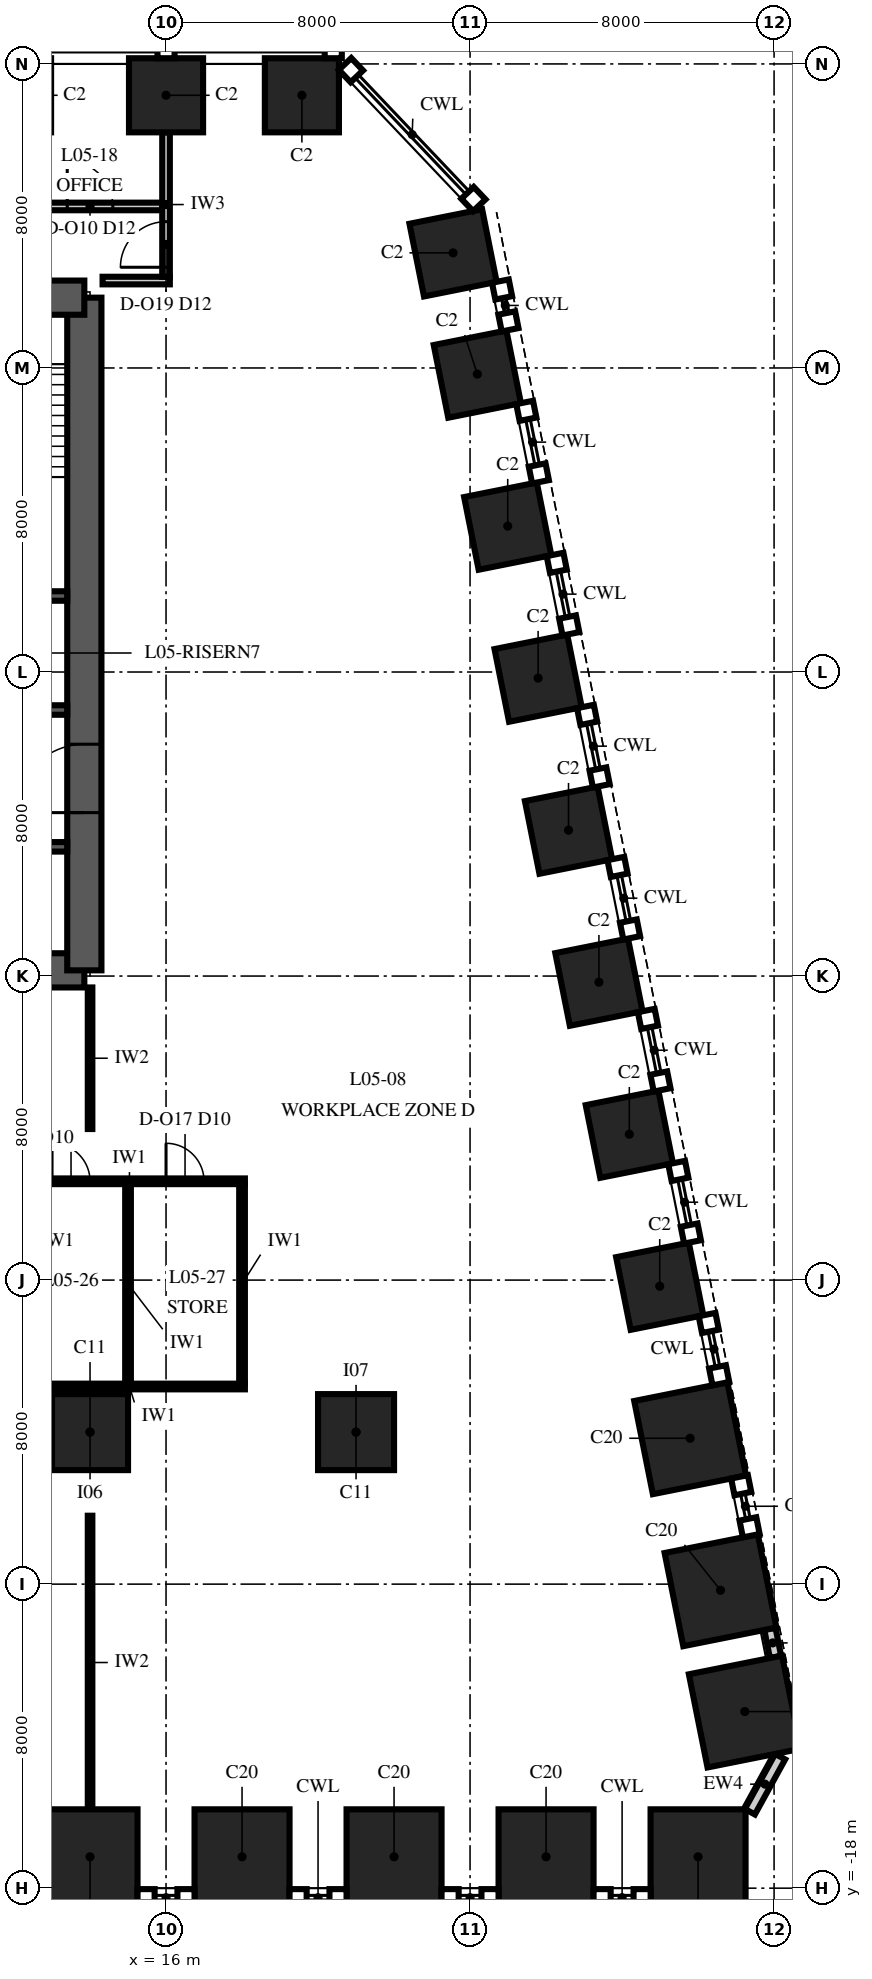
"""IFC4 building model, lengths in metres.
Left out: names, types, materials, properties, quantities, classifications, styles, units other than length and angle.
Written with IfcOpenShell. Run it as: python <this file> out.ifc"""

import sys

from ifc_helpers import new_model, si_unit, direction, frame, frame_2d, origin, origin_2d, place, context, subcontext, project, spatial, polyline, rectangle, outline, extrude, element, fill, save


model = new_model("IFC4")
c1 = context("Model", 3, precision=1e-05, world=origin(), true_north=direction((0.0, 1.0)))
c2 = subcontext(c1, "Body", "Model", "MODEL_VIEW")
j1 = project(units=[si_unit("LENGTHUNIT", "METRE"), si_unit("PLANEANGLEUNIT", "RADIAN")], contexts=[c1])
p1 = place(None, origin())
s1 = spatial("IfcSite", under=j1, at=p1, CompositionType="ELEMENT")
p2 = place(p1, origin())
s2 = spatial("IfcBuilding", under=s1, at=p2, CompositionType="ELEMENT")
p3 = place(p2, frame((0.0, 0.0, 32.0)))
s3 = spatial("IfcBuildingStorey", under=s2, at=p3, CompositionType="ELEMENT", Elevation=32.0)
for number, where, z_axis, x_axis in (
    (1, (14.0, -17.175, 0.0), (0.0, 0.0, 1.0), (1.0, 0.0, 0.0)),
    (2, (18.0, -17.175, 0.0), (0.0, 0.0, 1.0), (1.0, 0.0, 0.0)),
    (3, (22.0, -17.175, 0.0), (0.0, 0.0, 1.0), (1.0, 0.0, 0.0)),
    (4, (26.0, -17.175, 0.0), (0.0, 0.0, 1.0), (1.0, 0.0, 0.0)),
    (5, (30.0, -17.175, 0.0), (0.0, 0.0, 1.0), (1.0, 0.0, 0.0)),
    (6, (31.229, -13.353, 0.0), (0.0, 0.0, 1.0), (-0.196, 0.981, 0.0)),
    (7, (30.591, -10.162, 0.0), (0.0, 0.0, 1.0), (-0.196, 0.981, 0.0)),
    (8, (29.791, -6.162, 0.0), (0.0, 0.0, 1.0), (-0.196, 0.981, 0.0)),
):
    element("IfcColumn", number, at=place(p3, frame(where, z_axis=z_axis, x_axis=x_axis)), inside=s3, PredefinedType="COLUMN", context=c2, shape_type="SweptSolid", body=[
        extrude(rectangle(XDim=2.5, YDim=2.5, at=origin_2d()), origin(), (0.0, 0.0, 1.0), 4.0),
    ])
for number, where, z_axis, x_axis in (
    (9, (28.991, -2.162, 0.0), (0.0, 0.0, 1.0), (-0.196, 0.981, 0.0)),
    (10, (28.191, 1.838, 0.0), (0.0, 0.0, 1.0), (-0.196, 0.981, 0.0)),
    (11, (27.391, 5.838, 0.0), (0.0, 0.0, 1.0), (-0.196, 0.981, 0.0)),
    (12, (26.591, 9.838, 0.0), (0.0, 0.0, 1.0), (-0.196, 0.981, 0.0)),
    (13, (25.791, 13.838, 0.0), (0.0, 0.0, 1.0), (-0.196, 0.981, 0.0)),
    (14, (24.991, 17.838, 0.0), (0.0, 0.0, 1.0), (-0.196, 0.981, 0.0)),
    (15, (24.191, 21.838, 0.0), (0.0, 0.0, 1.0), (-0.196, 0.981, 0.0)),
    (16, (23.553, 25.029, 0.0), (0.0, 0.0, 1.0), (-0.196, 0.981, 0.0)),
    (17, (19.575, 29.175, 0.0), (0.0, 0.0, 1.0), (-1.0, 0.0, 0.0)),
    (18, (16.0, 29.175, 0.0), (0.0, 0.0, 1.0), (-1.0, 0.0, 0.0)),
):
    element("IfcColumn", number, at=place(p3, frame(where, z_axis=z_axis, x_axis=x_axis)), inside=s3, PredefinedType="COLUMN", context=c2, shape_type="SweptSolid", body=[
        extrude(rectangle(XDim=1.95, YDim=1.95, at=origin_2d()), origin(), (0.0, 0.0, 1.0), 4.0),
    ])
for number, where, z_axis, x_axis in (
    (19, (14.0, -6.0, 0.0), (0.0, 0.0, 1.0), (1.0, 0.0, 0.0)),
    (20, (21.0, -6.0, 0.0), (0.0, 0.0, 1.0), (1.0, 0.0, 0.0)),
):
    element("IfcColumn", number, at=place(p3, frame(where, z_axis=z_axis, x_axis=x_axis)), inside=s3, PredefinedType="COLUMN", context=c2, shape_type="SweptSolid", body=[
        extrude(rectangle(XDim=2.0, YDim=2.0, at=origin_2d()), origin(), (0.0, 0.0, 1.0), 4.0),
    ])
p4 = place(p3, frame((-13.85, 6.15, 0.0), z_axis=(0.0, 0.0, 1.0), x_axis=(1.0, 0.0, 0.0)))
e21 = element("IfcWall", 21, at=p4, inside=s3, PredefinedType="SHEAR", context=c2, shape_type="SweptSolid", body=[
    extrude(rectangle(XDim=27.7, YDim=0.9, at=frame_2d((13.85, 0.0))), origin(), (0.0, 0.0, 1.0), 4.0),
])
p5 = place(p3, frame((13.85, 6.15, 0.0), z_axis=(0.0, 0.0, 1.0), x_axis=(0.0, 1.0, 0.0)))
e22 = element("IfcWall", 22, at=p5, inside=s3, PredefinedType="SHEAR", context=c2, shape_type="SweptSolid", body=[
    extrude(outline(polyline([(0.0, -0.45), (17.7, -0.45), (17.7, 0.0), (17.25, 0.0), (17.25, 0.45), (0.45, 0.45), (0.45, 0.0), (0.0, 0.0), (0.0, -0.45)])), origin(), (0.0, 0.0, 1.0), 4.0),
])
p6 = place(p5, frame((4.15, 0.0, 0.0)))
e23 = element("IfcOpeningElement", 23, at=p6, cuts=e22, PredefinedType="OPENING", context=c2, shape_type="SweptSolid", body=[
    extrude(rectangle(XDim=1.8, YDim=2.4, at=frame_2d((0.9, 1.2))), frame((0.0, 0.465, 0.0), z_axis=(0.0, -1.0, 0.0), x_axis=(1.0, 0.0, 0.0)), (0.0, 0.0, 1.0), 0.93),
])
p7 = place(p3, frame((13.85, 23.85, 0.0), z_axis=(0.0, 0.0, 1.0), x_axis=(-1.0, 0.0, 0.0)))
e24 = element("IfcWall", 24, at=p7, inside=s3, PredefinedType="SHEAR", context=c2, shape_type="SweptSolid", body=[
    extrude(rectangle(XDim=27.7, YDim=0.9, at=frame_2d((13.85, 0.0))), origin(), (0.0, 0.0, 1.0), 4.0),
])
p8 = place(p7, frame((21.75, 0.0, 0.0)))
e25 = element("IfcOpeningElement", 25, at=p8, cuts=e24, PredefinedType="OPENING", context=c2, shape_type="SweptSolid", body=[
    extrude(rectangle(XDim=1.0, YDim=2.1, at=frame_2d((0.5, 1.05))), frame((0.0, 0.465, 0.0), z_axis=(0.0, -1.0, 0.0), x_axis=(1.0, 0.0, 0.0)), (0.0, 0.0, 1.0), 0.93),
])
p9 = place(p7, frame((4.95, 0.0, 0.0)))
e26 = element("IfcOpeningElement", 26, at=p9, cuts=e24, PredefinedType="OPENING", context=c2, shape_type="SweptSolid", body=[
    extrude(rectangle(XDim=1.0, YDim=2.1, at=frame_2d((0.5, 1.05))), frame((0.0, 0.465, 0.0), z_axis=(0.0, -1.0, 0.0), x_axis=(1.0, 0.0, 0.0)), (0.0, 0.0, 1.0), 0.93),
])
p10 = place(p7, frame((17.35, 0.0, 0.0)))
e27 = element("IfcOpeningElement", 27, at=p10, cuts=e24, PredefinedType="OPENING", context=c2, shape_type="SweptSolid", body=[
    extrude(rectangle(XDim=1.0, YDim=2.1, at=frame_2d((0.5, 1.05))), frame((0.0, 0.465, 0.0), z_axis=(0.0, -1.0, 0.0), x_axis=(1.0, 0.0, 0.0)), (0.0, 0.0, 1.0), 0.93),
])
p11 = place(p7, frame((13.35, 0.0, 0.0)))
e28 = element("IfcOpeningElement", 28, at=p11, cuts=e24, PredefinedType="OPENING", context=c2, shape_type="SweptSolid", body=[
    extrude(rectangle(XDim=1.0, YDim=2.1, at=frame_2d((0.5, 1.05))), frame((0.0, 0.465, 0.0), z_axis=(0.0, -1.0, 0.0), x_axis=(1.0, 0.0, 0.0)), (0.0, 0.0, 1.0), 0.93),
])
p12 = place(p7, frame((9.35, 0.0, 0.0)))
e29 = element("IfcOpeningElement", 29, at=p12, cuts=e24, PredefinedType="OPENING", context=c2, shape_type="SweptSolid", body=[
    extrude(rectangle(XDim=1.0, YDim=2.1, at=frame_2d((0.5, 1.05))), frame((0.0, 0.465, 0.0), z_axis=(0.0, -1.0, 0.0), x_axis=(1.0, 0.0, 0.0)), (0.0, 0.0, 1.0), 0.93),
])
p13 = place(p3, frame((-13.4, 9.4, 0.0), z_axis=(0.0, 0.0, 1.0), x_axis=(1.0, 0.0, 0.0)))
e30 = element("IfcWall", 30, at=p13, inside=s3, PredefinedType="SHEAR", context=c2, shape_type="SweptSolid", body=[
    extrude(rectangle(XDim=26.8, YDim=0.25, at=frame_2d((13.4, 0.0))), origin(), (0.0, 0.0, 1.0), 4.0),
])
p14 = place(p13, frame((0.25, 0.0, 0.0)))
e31 = element("IfcOpeningElement", 31, at=p14, cuts=e30, PredefinedType="OPENING", context=c2, shape_type="SweptSolid", body=[
    extrude(rectangle(XDim=1.1, YDim=2.1, at=frame_2d((0.55, 1.05))), frame((0.0, 0.14, 0.0), z_axis=(0.0, -1.0, 0.0), x_axis=(1.0, 0.0, 0.0)), (0.0, 0.0, 1.0), 0.28),
])
p15 = place(p13, frame((3.05, 0.0, 0.0)))
e32 = element("IfcOpeningElement", 32, at=p15, cuts=e30, PredefinedType="OPENING", context=c2, shape_type="SweptSolid", body=[
    extrude(rectangle(XDim=1.1, YDim=2.1, at=frame_2d((0.55, 1.05))), frame((0.0, 0.14, 0.0), z_axis=(0.0, -1.0, 0.0), x_axis=(1.0, 0.0, 0.0)), (0.0, 0.0, 1.0), 0.28),
])
p16 = place(p13, frame((5.85, 0.0, 0.0)))
e33 = element("IfcOpeningElement", 33, at=p16, cuts=e30, PredefinedType="OPENING", context=c2, shape_type="SweptSolid", body=[
    extrude(rectangle(XDim=1.1, YDim=2.1, at=frame_2d((0.55, 1.05))), frame((0.0, 0.14, 0.0), z_axis=(0.0, -1.0, 0.0), x_axis=(1.0, 0.0, 0.0)), (0.0, 0.0, 1.0), 0.28),
])
p17 = place(p3, frame((-13.4, 13.0, 0.0), z_axis=(0.0, 0.0, 1.0), x_axis=(1.0, 0.0, 0.0)))
e34 = element("IfcWall", 34, at=p17, inside=s3, PredefinedType="SHEAR", context=c2, shape_type="SweptSolid", body=[
    extrude(rectangle(XDim=26.8, YDim=0.25, at=frame_2d((13.4, 0.0))), origin(), (0.0, 0.0, 1.0), 4.0),
])
p18 = place(p17, frame((0.25, 0.0, 0.0)))
e35 = element("IfcOpeningElement", 35, at=p18, cuts=e34, PredefinedType="OPENING", context=c2, shape_type="SweptSolid", body=[
    extrude(rectangle(XDim=1.1, YDim=2.1, at=frame_2d((0.55, 1.05))), frame((0.0, 0.14, 0.0), z_axis=(0.0, -1.0, 0.0), x_axis=(1.0, 0.0, 0.0)), (0.0, 0.0, 1.0), 0.28),
])
p19 = place(p17, frame((8.65, 0.0, 0.0)))
e36 = element("IfcOpeningElement", 36, at=p19, cuts=e34, PredefinedType="OPENING", context=c2, shape_type="SweptSolid", body=[
    extrude(rectangle(XDim=1.1, YDim=2.1, at=frame_2d((0.55, 1.05))), frame((0.0, 0.14, 0.0), z_axis=(0.0, -1.0, 0.0), x_axis=(1.0, 0.0, 0.0)), (0.0, 0.0, 1.0), 0.28),
])
p20 = place(p17, frame((12.05, 0.0, 0.0)))
e37 = element("IfcOpeningElement", 37, at=p20, cuts=e34, PredefinedType="OPENING", context=c2, shape_type="SweptSolid", body=[
    extrude(rectangle(XDim=1.1, YDim=2.1, at=frame_2d((0.55, 1.05))), frame((0.0, 0.14, 0.0), z_axis=(0.0, -1.0, 0.0), x_axis=(1.0, 0.0, 0.0)), (0.0, 0.0, 1.0), 0.28),
])
p21 = place(p17, frame((15.05, 0.0, 0.0)))
e38 = element("IfcOpeningElement", 38, at=p21, cuts=e34, PredefinedType="OPENING", context=c2, shape_type="SweptSolid", body=[
    extrude(rectangle(XDim=0.9, YDim=2.1, at=frame_2d((0.45, 1.05))), frame((0.0, 0.14, 0.0), z_axis=(0.0, -1.0, 0.0), x_axis=(1.0, 0.0, 0.0)), (0.0, 0.0, 1.0), 0.28),
])
p22 = place(p17, frame((17.45, 0.0, 0.0)))
e39 = element("IfcOpeningElement", 39, at=p22, cuts=e34, PredefinedType="OPENING", context=c2, shape_type="SweptSolid", body=[
    extrude(rectangle(XDim=0.9, YDim=2.1, at=frame_2d((0.45, 1.05))), frame((0.0, 0.14, 0.0), z_axis=(0.0, -1.0, 0.0), x_axis=(1.0, 0.0, 0.0)), (0.0, 0.0, 1.0), 0.28),
])
p23 = place(p17, frame((20.95, 0.0, 0.0)))
e40 = element("IfcOpeningElement", 40, at=p23, cuts=e34, PredefinedType="OPENING", context=c2, shape_type="SweptSolid", body=[
    extrude(rectangle(XDim=0.9, YDim=2.1, at=frame_2d((0.45, 1.05))), frame((0.0, 0.14, 0.0), z_axis=(0.0, -1.0, 0.0), x_axis=(1.0, 0.0, 0.0)), (0.0, 0.0, 1.0), 0.28),
])
p24 = place(p3, frame((-13.4, 16.0, 0.0), z_axis=(0.0, 0.0, 1.0), x_axis=(1.0, 0.0, 0.0)))
e41 = element("IfcWall", 41, at=p24, inside=s3, PredefinedType="SHEAR", context=c2, shape_type="SweptSolid", body=[
    extrude(rectangle(XDim=26.8, YDim=0.25, at=frame_2d((13.4, 0.0))), origin(), (0.0, 0.0, 1.0), 4.0),
])
p25 = place(p3, frame((31.363, -15.988, 0.0), z_axis=(0.0, 0.0, 1.0), x_axis=(0.481879089964, 0.876237720402, 0.0)))
e42 = element("IfcWall", 42, at=p25, inside=s3, PredefinedType="SOLIDWALL", context=c2, shape_type="SweptSolid", body=[
    extrude(rectangle(XDim=1.654, YDim=0.3, at=frame_2d((0.827, 0.0))), origin(), (0.0, 0.0, 1.0), 4.0),
])
p26 = place(p3, frame((32.038, -11.916, 0.0), z_axis=(0.0, 0.0, 1.0), x_axis=(-0.195867092459, 0.980630451338, 0.0)))
e43 = element("IfcWall", 43, at=p26, inside=s3, PredefinedType="SOLIDWALL", context=c2, shape_type="SweptSolid", body=[
    extrude(rectangle(XDim=0.754, YDim=0.3, at=frame_2d((0.377, 0.0))), origin(), (0.0, 0.0, 1.0), 4.0),
])
p27 = place(p3, frame((12.0, -4.8, 0.0), z_axis=(0.0, 0.0, 1.0), x_axis=(1.0, 0.0, 0.0)))
e44 = element("IfcWall", 44, at=p27, inside=s3, PredefinedType="PARTITIONING", context=c2, shape_type="SweptSolid", body=[
    extrude(rectangle(XDim=6.075, YDim=0.15, at=frame_2d((3.038, 0.0))), origin(), (0.0, 0.0, 1.0), 3.25),
])
p28 = place(p3, frame((12.0, 0.6, 0.0), z_axis=(0.0, 0.0, 1.0), x_axis=(1.0, 0.0, 0.0)))
e45 = element("IfcWall", 45, at=p28, inside=s3, PredefinedType="PARTITIONING", context=c2, shape_type="SweptSolid", body=[
    extrude(rectangle(XDim=6.075, YDim=0.15, at=frame_2d((3.038, 0.0))), origin(), (0.0, 0.0, 1.0), 3.25),
])
p29 = place(p28, frame((1.0, 0.0, 0.0)))
e46 = element("IfcOpeningElement", 46, at=p29, cuts=e45, PredefinedType="OPENING", context=c2, shape_type="SweptSolid", body=[
    extrude(rectangle(XDim=1.0, YDim=2.3, at=frame_2d((0.5, 1.15))), frame((0.0, 0.09, 0.0), z_axis=(0.0, -1.0, 0.0), x_axis=(1.0, 0.0, 0.0)), (0.0, 0.0, 1.0), 0.18),
])
p30 = place(p28, frame((4.0, 0.0, 0.0)))
e47 = element("IfcOpeningElement", 47, at=p30, cuts=e45, PredefinedType="OPENING", context=c2, shape_type="SweptSolid", body=[
    extrude(rectangle(XDim=1.0, YDim=2.3, at=frame_2d((0.5, 1.15))), frame((0.0, 0.09, 0.0), z_axis=(0.0, -1.0, 0.0), x_axis=(1.0, 0.0, 0.0)), (0.0, 0.0, 1.0), 0.18),
])
p31 = place(p3, frame((14.33, 24.3, 0.0), z_axis=(0.0, 0.0, 1.0), x_axis=(1.0, 0.0, 0.0)))
e48 = element("IfcWall", 48, at=p31, inside=s3, PredefinedType="PARTITIONING", context=c2, shape_type="SweptSolid", body=[
    extrude(rectangle(XDim=1.77, YDim=0.2, at=frame_2d((0.885, 0.0))), origin(), (0.0, 0.0, 1.0), 3.4),
])
p32 = place(p3, frame((-16.35, 26.25, 0.0), z_axis=(0.0, 0.0, 1.0), x_axis=(1.0, 0.0, 0.0)))
e49 = element("IfcWall", 49, at=p32, inside=s3, PredefinedType="PARTITIONING", context=c2, shape_type="SweptSolid", body=[
    extrude(rectangle(XDim=32.25, YDim=0.2, at=frame_2d((16.125, 0.0))), origin(), (0.0, 0.0, 1.0), 3.4),
])
p33 = place(p32, frame((1.75, 0.0, 0.0)))
e50 = element("IfcOpeningElement", 50, at=p33, cuts=e49, PredefinedType="OPENING", context=c2, shape_type="SweptSolid", body=[
    extrude(rectangle(XDim=1.2, YDim=2.4, at=frame_2d((0.6, 1.2))), frame((0.0, 0.115, 0.0), z_axis=(0.0, -1.0, 0.0), x_axis=(1.0, 0.0, 0.0)), (0.0, 0.0, 1.0), 0.23),
])
p34 = place(p32, frame((5.75, 0.0, 0.0)))
e51 = element("IfcOpeningElement", 51, at=p34, cuts=e49, PredefinedType="OPENING", context=c2, shape_type="SweptSolid", body=[
    extrude(rectangle(XDim=1.2, YDim=2.4, at=frame_2d((0.6, 1.2))), frame((0.0, 0.115, 0.0), z_axis=(0.0, -1.0, 0.0), x_axis=(1.0, 0.0, 0.0)), (0.0, 0.0, 1.0), 0.23),
])
p35 = place(p32, frame((9.75, 0.0, 0.0)))
e52 = element("IfcOpeningElement", 52, at=p35, cuts=e49, PredefinedType="OPENING", context=c2, shape_type="SweptSolid", body=[
    extrude(rectangle(XDim=1.2, YDim=2.4, at=frame_2d((0.6, 1.2))), frame((0.0, 0.115, 0.0), z_axis=(0.0, -1.0, 0.0), x_axis=(1.0, 0.0, 0.0)), (0.0, 0.0, 1.0), 0.23),
])
p36 = place(p32, frame((13.75, 0.0, 0.0)))
e53 = element("IfcOpeningElement", 53, at=p36, cuts=e49, PredefinedType="OPENING", context=c2, shape_type="SweptSolid", body=[
    extrude(rectangle(XDim=1.2, YDim=2.4, at=frame_2d((0.6, 1.2))), frame((0.0, 0.115, 0.0), z_axis=(0.0, -1.0, 0.0), x_axis=(1.0, 0.0, 0.0)), (0.0, 0.0, 1.0), 0.23),
])
p37 = place(p32, frame((17.75, 0.0, 0.0)))
e54 = element("IfcOpeningElement", 54, at=p37, cuts=e49, PredefinedType="OPENING", context=c2, shape_type="SweptSolid", body=[
    extrude(rectangle(XDim=1.2, YDim=2.4, at=frame_2d((0.6, 1.2))), frame((0.0, 0.115, 0.0), z_axis=(0.0, -1.0, 0.0), x_axis=(1.0, 0.0, 0.0)), (0.0, 0.0, 1.0), 0.23),
])
p38 = place(p32, frame((21.75, 0.0, 0.0)))
e55 = element("IfcOpeningElement", 55, at=p38, cuts=e49, PredefinedType="OPENING", context=c2, shape_type="SweptSolid", body=[
    extrude(rectangle(XDim=1.2, YDim=2.4, at=frame_2d((0.6, 1.2))), frame((0.0, 0.115, 0.0), z_axis=(0.0, -1.0, 0.0), x_axis=(1.0, 0.0, 0.0)), (0.0, 0.0, 1.0), 0.23),
])
p39 = place(p32, frame((25.75, 0.0, 0.0)))
e56 = element("IfcOpeningElement", 56, at=p39, cuts=e49, PredefinedType="OPENING", context=c2, shape_type="SweptSolid", body=[
    extrude(rectangle(XDim=1.2, YDim=2.4, at=frame_2d((0.6, 1.2))), frame((0.0, 0.115, 0.0), z_axis=(0.0, -1.0, 0.0), x_axis=(1.0, 0.0, 0.0)), (0.0, 0.0, 1.0), 0.23),
])
p40 = place(p32, frame((29.75, 0.0, 0.0)))
e57 = element("IfcOpeningElement", 57, at=p40, cuts=e49, PredefinedType="OPENING", context=c2, shape_type="SweptSolid", body=[
    extrude(rectangle(XDim=1.2, YDim=2.4, at=frame_2d((0.6, 1.2))), frame((0.0, 0.115, 0.0), z_axis=(0.0, -1.0, 0.0), x_axis=(1.0, 0.0, 0.0)), (0.0, 0.0, 1.0), 0.23),
])
p41 = place(p3, frame((15.0, -4.725, 0.0), z_axis=(0.0, 0.0, 1.0), x_axis=(0.0, 1.0, 0.0)))
e58 = element("IfcWall", 58, at=p41, inside=s3, PredefinedType="PARTITIONING", context=c2, shape_type="SweptSolid", body=[
    extrude(rectangle(XDim=5.25, YDim=0.15, at=frame_2d((2.625, 0.0))), origin(), (0.0, 0.0, 1.0), 3.85),
])
p42 = place(p3, frame((16.0, 24.4, 0.0), z_axis=(0.0, 0.0, 1.0), x_axis=(0.0, 1.0, 0.0)))
e59 = element("IfcWall", 59, at=p42, inside=s3, PredefinedType="PARTITIONING", context=c2, shape_type="SweptSolid", body=[
    extrude(rectangle(XDim=3.8, YDim=0.2, at=frame_2d((1.9, 0.0))), origin(), (0.0, 0.0, 1.0), 3.4),
])
p43 = place(p42, frame((0.25, 0.0, 0.0)))
e60 = element("IfcOpeningElement", 60, at=p43, cuts=e59, PredefinedType="OPENING", context=c2, shape_type="SweptSolid", body=[
    extrude(rectangle(XDim=1.2, YDim=2.4, at=frame_2d((0.6, 1.2))), frame((0.0, 0.115, 0.0), z_axis=(0.0, -1.0, 0.0), x_axis=(1.0, 0.0, 0.0)), (0.0, 0.0, 1.0), 0.23),
])
p44 = place(p3, frame((18.0, -4.725, 0.0), z_axis=(0.0, 0.0, 1.0), x_axis=(0.0, 1.0, 0.0)))
e61 = element("IfcWall", 61, at=p44, inside=s3, PredefinedType="PARTITIONING", context=c2, shape_type="SweptSolid", body=[
    extrude(rectangle(XDim=5.25, YDim=0.15, at=frame_2d((2.625, 0.0))), origin(), (0.0, 0.0, 1.0), 3.25),
])
p45 = place(p3, frame((14.001, -15.925, 0.0), z_axis=(0.0, 0.0, 1.0), x_axis=(0.0, 1.0, 0.0)))
e62 = element("IfcWall", 62, at=p45, inside=s3, PredefinedType="PARTITIONING", context=c2, shape_type="SweptSolid", body=[
    extrude(rectangle(XDim=7.725, YDim=0.12, at=frame_2d((3.863, 0.0))), origin(), (0.0, 0.0, 1.0), 3.25),
])
p46 = place(p3, frame((14.001, 1.975, 0.0), z_axis=(0.0, 0.0, 1.0), x_axis=(0.0, 1.0, 0.0)))
e63 = element("IfcWall", 63, at=p46, inside=s3, PredefinedType="PARTITIONING", context=c2, shape_type="SweptSolid", body=[
    extrude(rectangle(XDim=3.725, YDim=0.12, at=frame_2d((1.862, 0.0))), origin(), (0.0, 0.0, 1.0), 3.25),
])
p47 = place(p6, origin())
e64 = element("IfcDoor", 64, at=p47, inside=s3, OperationType="DOUBLE_DOOR_SINGLE_SWING", PredefinedType="DOOR", context=c2, shape_type="SweptSolid", body=[
    extrude(rectangle(XDim=1.8, YDim=2.4, at=frame_2d((0.9, 1.2))), frame((0.0, 0.45, 0.0), z_axis=(0.0, -1.0, 0.0), x_axis=(1.0, 0.0, 0.0)), (0.0, 0.0, 1.0), 0.899),
])
fill(e23, e64)
p48 = place(p40, origin())
e65 = element("IfcDoor", 65, at=p48, inside=s3, OperationType="SINGLE_SWING_LEFT", PredefinedType="DOOR", context=c2, shape_type="SweptSolid", body=[
    extrude(rectangle(XDim=1.2, YDim=2.4, at=frame_2d((0.6, 1.2))), frame((0.0, 0.1, 0.0), z_axis=(0.0, -1.0, 0.0), x_axis=(1.0, 0.0, 0.0)), (0.0, 0.0, 1.0), 0.199),
])
fill(e57, e65)
p49 = place(p29, origin())
e66 = element("IfcDoor", 66, at=p49, inside=s3, OperationType="SINGLE_SWING_LEFT", PredefinedType="DOOR", context=c2, shape_type="SweptSolid", body=[
    extrude(rectangle(XDim=1.0, YDim=2.3, at=frame_2d((0.5, 1.15))), frame((0.0, 0.075, 0.0), z_axis=(0.0, -1.0, 0.0), x_axis=(1.0, 0.0, 0.0)), (0.0, 0.0, 1.0), 0.149),
])
fill(e46, e66)
p50 = place(p30, origin())
e67 = element("IfcDoor", 67, at=p50, inside=s3, OperationType="SINGLE_SWING_LEFT", PredefinedType="DOOR", context=c2, shape_type="SweptSolid", body=[
    extrude(rectangle(XDim=1.0, YDim=2.3, at=frame_2d((0.5, 1.15))), frame((0.0, 0.075, 0.0), z_axis=(0.0, -1.0, 0.0), x_axis=(1.0, 0.0, 0.0)), (0.0, 0.0, 1.0), 0.149),
])
fill(e47, e67)
p51 = place(p43, origin())
e68 = element("IfcDoor", 68, at=p51, inside=s3, OperationType="SINGLE_SWING_LEFT", PredefinedType="DOOR", context=c2, shape_type="SweptSolid", body=[
    extrude(rectangle(XDim=1.2, YDim=2.4, at=frame_2d((0.6, 1.2))), frame((0.0, 0.1, 0.0), z_axis=(0.0, -1.0, 0.0), x_axis=(1.0, 0.0, 0.0)), (0.0, 0.0, 1.0), 0.199),
])
fill(e60, e68)
save(model, sys.argv[1])
